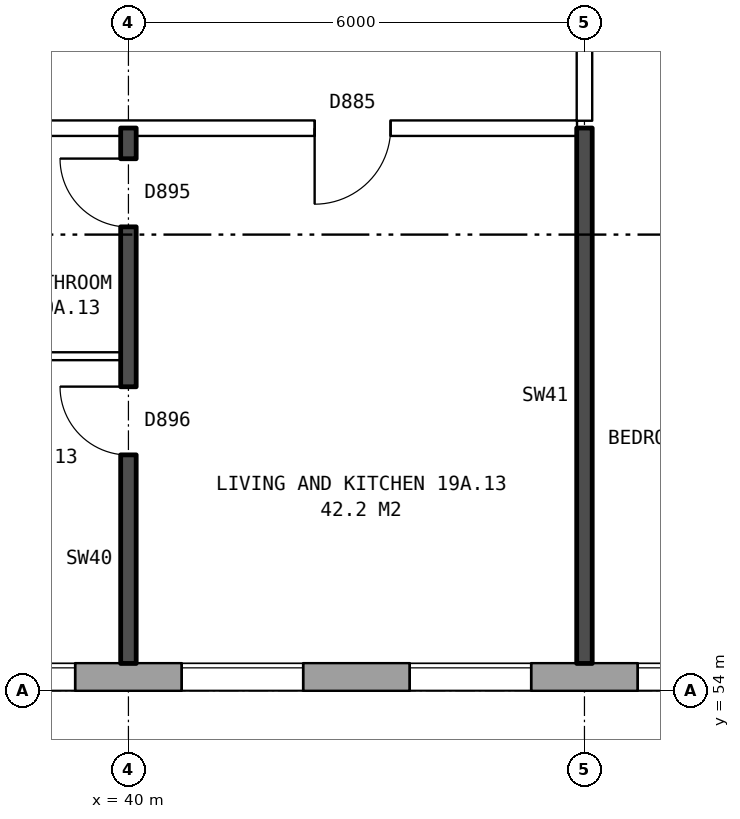
"""IFC4 building model, lengths in metres.
Left out: names, types, materials, properties, quantities, classifications, styles, units other than length and angle.
Written with IfcOpenShell. Run it as: python <this file> out.ifc"""

import sys

from ifc_helpers import new_model, si_unit, direction, frame, frame_2d, origin, place, context, subcontext, project, spatial, rectangle, extrude, element, fill, save


model = new_model("IFC4")
c1 = context("Model", 3, precision=1e-05, world=origin(), true_north=direction((0.0, 1.0)))
c2 = subcontext(c1, "Body", "Model", "MODEL_VIEW")
j1 = project(units=[si_unit("LENGTHUNIT", "METRE"), si_unit("PLANEANGLEUNIT", "RADIAN")], contexts=[c1])
p1 = place(None, origin())
s1 = spatial("IfcSite", under=j1, at=p1, CompositionType="ELEMENT")
p2 = place(p1, origin())
s2 = spatial("IfcBuilding", under=s1, at=p2, CompositionType="ELEMENT")
p3 = place(p2, frame((0.0, 0.0, 71.6)))
s3 = spatial("IfcBuildingStorey", under=s2, at=p3, CompositionType="ELEMENT", Elevation=71.6)
p4 = place(p3, frame((26.325, 54.18, 0.0), z_axis=(0.0, 0.0, 1.0), x_axis=(1.0, 0.0, 0.0)))
e1 = element("IfcWall", 1, at=p4, inside=s3, PredefinedType="STANDARD", context=c2, shape_type="SweptSolid", body=[
    extrude(rectangle(XDim=46.601, YDim=0.36, at=frame_2d((23.3, 0.0))), origin(), (0.0, 0.0, 1.0), 2.85),
])
p5 = place(p4, frame((1.875, 0.0, 1.0)))
e2 = element("IfcOpeningElement", 2, at=p5, cuts=e1, PredefinedType="OPENING", context=c2, shape_type="SweptSolid", body=[
    extrude(rectangle(XDim=0.6, YDim=1.5, at=frame_2d((0.3, 0.75))), frame((0.0, 0.19, 0.0), z_axis=(0.0, -1.0, 0.0), x_axis=(1.0, 0.0, 0.0)), (0.0, 0.0, 1.0), 0.38),
])
p6 = place(p4, frame((5.375, 0.0, 0.8)))
e3 = element("IfcOpeningElement", 3, at=p6, cuts=e1, PredefinedType="OPENING", context=c2, shape_type="SweptSolid", body=[
    extrude(rectangle(XDim=1.6, YDim=1.8, at=frame_2d((0.8, 0.9))), frame((0.0, 0.19, 0.0), z_axis=(0.0, -1.0, 0.0), x_axis=(1.0, 0.0, 0.0)), (0.0, 0.0, 1.0), 0.38),
])
p7 = place(p4, frame((8.375, 0.0, 0.8)))
e4 = element("IfcOpeningElement", 4, at=p7, cuts=e1, PredefinedType="OPENING", context=c2, shape_type="SweptSolid", body=[
    extrude(rectangle(XDim=1.6, YDim=1.8, at=frame_2d((0.8, 0.9))), frame((0.0, 0.19, 0.0), z_axis=(0.0, -1.0, 0.0), x_axis=(1.0, 0.0, 0.0)), (0.0, 0.0, 1.0), 0.38),
])
p8 = place(p4, frame((11.375, 0.0, 0.8)))
e5 = element("IfcOpeningElement", 5, at=p8, cuts=e1, PredefinedType="OPENING", context=c2, shape_type="SweptSolid", body=[
    extrude(rectangle(XDim=1.6, YDim=1.8, at=frame_2d((0.8, 0.9))), frame((0.0, 0.19, 0.0), z_axis=(0.0, -1.0, 0.0), x_axis=(1.0, 0.0, 0.0)), (0.0, 0.0, 1.0), 0.38),
])
p9 = place(p4, frame((14.375, 0.0, 0.8)))
e6 = element("IfcOpeningElement", 6, at=p9, cuts=e1, PredefinedType="OPENING", context=c2, shape_type="SweptSolid", body=[
    extrude(rectangle(XDim=1.6, YDim=1.8, at=frame_2d((0.8, 0.9))), frame((0.0, 0.19, 0.0), z_axis=(0.0, -1.0, 0.0), x_axis=(1.0, 0.0, 0.0)), (0.0, 0.0, 1.0), 0.38),
])
p10 = place(p4, frame((17.375, 0.0, 0.8)))
e7 = element("IfcOpeningElement", 7, at=p10, cuts=e1, PredefinedType="OPENING", context=c2, shape_type="SweptSolid", body=[
    extrude(rectangle(XDim=1.6, YDim=1.8, at=frame_2d((0.8, 0.9))), frame((0.0, 0.19, 0.0), z_axis=(0.0, -1.0, 0.0), x_axis=(1.0, 0.0, 0.0)), (0.0, 0.0, 1.0), 0.38),
])
p11 = place(p4, frame((20.375, 0.0, 0.8)))
e8 = element("IfcOpeningElement", 8, at=p11, cuts=e1, PredefinedType="OPENING", context=c2, shape_type="SweptSolid", body=[
    extrude(rectangle(XDim=1.6, YDim=1.8, at=frame_2d((0.8, 0.9))), frame((0.0, 0.19, 0.0), z_axis=(0.0, -1.0, 0.0), x_axis=(1.0, 0.0, 0.0)), (0.0, 0.0, 1.0), 0.38),
])
p12 = place(p4, frame((23.375, 0.0, 0.8)))
e9 = element("IfcOpeningElement", 9, at=p12, cuts=e1, PredefinedType="OPENING", context=c2, shape_type="SweptSolid", body=[
    extrude(rectangle(XDim=1.6, YDim=1.8, at=frame_2d((0.8, 0.9))), frame((0.0, 0.19, 0.0), z_axis=(0.0, -1.0, 0.0), x_axis=(1.0, 0.0, 0.0)), (0.0, 0.0, 1.0), 0.38),
])
p13 = place(p4, frame((26.375, 0.0, 0.8)))
e10 = element("IfcOpeningElement", 10, at=p13, cuts=e1, PredefinedType="OPENING", context=c2, shape_type="SweptSolid", body=[
    extrude(rectangle(XDim=1.6, YDim=1.8, at=frame_2d((0.8, 0.9))), frame((0.0, 0.19, 0.0), z_axis=(0.0, -1.0, 0.0), x_axis=(1.0, 0.0, 0.0)), (0.0, 0.0, 1.0), 0.38),
])
p14 = place(p4, frame((29.375, 0.0, 0.8)))
e11 = element("IfcOpeningElement", 11, at=p14, cuts=e1, PredefinedType="OPENING", context=c2, shape_type="SweptSolid", body=[
    extrude(rectangle(XDim=1.6, YDim=1.8, at=frame_2d((0.8, 0.9))), frame((0.0, 0.19, 0.0), z_axis=(0.0, -1.0, 0.0), x_axis=(1.0, 0.0, 0.0)), (0.0, 0.0, 1.0), 0.38),
])
p15 = place(p4, frame((32.375, 0.0, 0.8)))
e12 = element("IfcOpeningElement", 12, at=p15, cuts=e1, PredefinedType="OPENING", context=c2, shape_type="SweptSolid", body=[
    extrude(rectangle(XDim=1.6, YDim=1.8, at=frame_2d((0.8, 0.9))), frame((0.0, 0.19, 0.0), z_axis=(0.0, -1.0, 0.0), x_axis=(1.0, 0.0, 0.0)), (0.0, 0.0, 1.0), 0.38),
])
p16 = place(p4, frame((35.375, 0.0, 0.8)))
e13 = element("IfcOpeningElement", 13, at=p16, cuts=e1, PredefinedType="OPENING", context=c2, shape_type="SweptSolid", body=[
    extrude(rectangle(XDim=1.6, YDim=1.8, at=frame_2d((0.8, 0.9))), frame((0.0, 0.19, 0.0), z_axis=(0.0, -1.0, 0.0), x_axis=(1.0, 0.0, 0.0)), (0.0, 0.0, 1.0), 0.38),
])
p17 = place(p4, frame((38.375, 0.0, 0.8)))
e14 = element("IfcOpeningElement", 14, at=p17, cuts=e1, PredefinedType="OPENING", context=c2, shape_type="SweptSolid", body=[
    extrude(rectangle(XDim=1.6, YDim=1.8, at=frame_2d((0.8, 0.9))), frame((0.0, 0.19, 0.0), z_axis=(0.0, -1.0, 0.0), x_axis=(1.0, 0.0, 0.0)), (0.0, 0.0, 1.0), 0.38),
])
p18 = place(p4, frame((40.275, 0.0, 0.8)))
e15 = element("IfcOpeningElement", 15, at=p18, cuts=e1, PredefinedType="OPENING", context=c2, shape_type="SweptSolid", body=[
    extrude(rectangle(XDim=0.6, YDim=1.8, at=frame_2d((0.3, 0.9))), frame((0.0, 0.19, 0.0), z_axis=(0.0, -1.0, 0.0), x_axis=(1.0, 0.0, 0.0)), (0.0, 0.0, 1.0), 0.38),
])
p19 = place(p4, frame((44.375, 0.0, 0.8)))
e16 = element("IfcOpeningElement", 16, at=p19, cuts=e1, PredefinedType="OPENING", context=c2, shape_type="SweptSolid", body=[
    extrude(rectangle(XDim=1.6, YDim=1.8, at=frame_2d((0.8, 0.9))), frame((0.0, 0.19, 0.0), z_axis=(0.0, -1.0, 0.0), x_axis=(1.0, 0.0, 0.0)), (0.0, 0.0, 1.0), 0.38),
])
p20 = place(p4, frame((2.775, 0.0, 1.7)))
e17 = element("IfcOpeningElement", 17, at=p20, cuts=e1, PredefinedType="OPENING", context=c2, shape_type="SweptSolid", body=[
    extrude(rectangle(XDim=0.6, YDim=0.9, at=frame_2d((0.3, 0.45))), frame((0.0, 0.19, 0.0), z_axis=(0.0, -1.0, 0.0), x_axis=(1.0, 0.0, 0.0)), (0.0, 0.0, 1.0), 0.38),
])
p21 = place(p4, frame((41.175, 0.0, 0.8)))
e18 = element("IfcOpeningElement", 18, at=p21, cuts=e1, PredefinedType="OPENING", context=c2, shape_type="SweptSolid", body=[
    extrude(rectangle(XDim=0.8, YDim=0.9, at=frame_2d((0.4, 0.45))), frame((0.0, 0.19, 0.0), z_axis=(0.0, -1.0, 0.0), x_axis=(1.0, 0.0, 0.0)), (0.0, 0.0, 1.0), 0.38),
])
p22 = place(p3, frame((38.3, 58.4, 0.0), z_axis=(0.0, 0.0, 1.0), x_axis=(1.0, 0.0, 0.0)))
e19 = element("IfcWall", 19, at=p22, inside=s3, PredefinedType="PARTITIONING", context=c2, shape_type="SweptSolid", body=[
    extrude(rectangle(XDim=1.6, YDim=0.1, at=frame_2d((0.8, 0.0))), origin(), (0.0, 0.0, 1.0), 2.85),
])
p23 = place(p3, frame((23.61, 61.4, 0.0), z_axis=(0.0, 0.0, 1.0), x_axis=(1.0, 0.0, 0.0)))
e20 = element("IfcWall", 20, at=p23, inside=s3, PredefinedType="PARTITIONING", context=c2, shape_type="SweptSolid", body=[
    extrude(rectangle(XDim=22.29, YDim=0.2, at=frame_2d((11.145, 0.0))), origin(), (0.0, 0.0, 1.0), 2.85),
])
p24 = place(p23, frame((18.84, 0.0, 0.0)))
e21 = element("IfcOpeningElement", 21, at=p24, cuts=e20, PredefinedType="OPENING", context=c2, shape_type="SweptSolid", body=[
    extrude(rectangle(XDim=1.0, YDim=2.1, at=frame_2d((0.5, 1.05))), frame((0.0, 0.11, 0.0), z_axis=(0.0, -1.0, 0.0), x_axis=(1.0, 0.0, 0.0)), (0.0, 0.0, 1.0), 0.22),
])
p25 = place(p23, frame((6.89, 0.0, 0.0)))
e22 = element("IfcOpeningElement", 22, at=p25, cuts=e20, PredefinedType="OPENING", context=c2, shape_type="SweptSolid", body=[
    extrude(rectangle(XDim=1.0, YDim=2.1, at=frame_2d((0.5, 1.05))), frame((0.0, 0.11, 0.0), z_axis=(0.0, -1.0, 0.0), x_axis=(1.0, 0.0, 0.0)), (0.0, 0.0, 1.0), 0.22),
])
p26 = place(p3, frame((40.0, 54.36, 0.0), z_axis=(0.0, 0.0, 1.0), x_axis=(0.0, 1.0, 0.0)))
e23 = element("IfcWall", 23, at=p26, inside=s3, PredefinedType="SOLIDWALL", context=c2, shape_type="SweptSolid", body=[
    extrude(rectangle(XDim=7.04, YDim=0.2, at=frame_2d((3.52, 0.0))), origin(), (0.0, 0.0, 1.0), 2.85),
])
p27 = place(p26, frame((2.74, 0.0, 0.0)))
e24 = element("IfcOpeningElement", 24, at=p27, cuts=e23, PredefinedType="OPENING", context=c2, shape_type="SweptSolid", body=[
    extrude(rectangle(XDim=0.9, YDim=2.1, at=frame_2d((0.45, 1.05))), frame((0.0, 0.11, 0.0), z_axis=(0.0, -1.0, 0.0), x_axis=(1.0, 0.0, 0.0)), (0.0, 0.0, 1.0), 0.22),
])
p28 = place(p26, frame((5.74, 0.0, 0.0)))
e25 = element("IfcOpeningElement", 25, at=p28, cuts=e23, PredefinedType="OPENING", context=c2, shape_type="SweptSolid", body=[
    extrude(rectangle(XDim=0.9, YDim=2.1, at=frame_2d((0.45, 1.05))), frame((0.0, 0.11, 0.0), z_axis=(0.0, -1.0, 0.0), x_axis=(1.0, 0.0, 0.0)), (0.0, 0.0, 1.0), 0.22),
])
p29 = place(p3, frame((46.0, 54.36, 0.0), z_axis=(0.0, 0.0, 1.0), x_axis=(0.0, 1.0, 0.0)))
e26 = element("IfcWall", 26, at=p29, inside=s3, PredefinedType="SOLIDWALL", context=c2, shape_type="SweptSolid", body=[
    extrude(rectangle(XDim=7.04, YDim=0.2, at=frame_2d((3.52, 0.0))), origin(), (0.0, 0.0, 1.0), 2.85),
])
p30 = place(p3, frame((46.0, 61.5, 0.0), z_axis=(0.0, 0.0, 1.0), x_axis=(0.0, 1.0, 0.0)))
e27 = element("IfcWall", 27, at=p30, inside=s3, PredefinedType="PARTITIONING", context=c2, shape_type="SweptSolid", body=[
    extrude(rectangle(XDim=2.2, YDim=0.2, at=frame_2d((1.1, 0.0))), origin(), (0.0, 0.0, 1.0), 2.85),
])
p31 = place(p8, origin())
e28 = element("IfcWindow", 28, at=p31, inside=s3, PartitioningType="SINGLE_PANEL", PredefinedType="WINDOW", context=c2, shape_type="SweptSolid", body=[
    extrude(rectangle(XDim=1.6, YDim=1.8, at=frame_2d((0.8, 0.9))), frame((0.0, 0.15, 0.0), z_axis=(0.0, -1.0, 0.0), x_axis=(1.0, 0.0, 0.0)), (0.0, 0.0, 1.0), 0.06),
])
fill(e5, e28)
p32 = place(p9, origin())
e29 = element("IfcWindow", 29, at=p32, inside=s3, PartitioningType="SINGLE_PANEL", PredefinedType="WINDOW", context=c2, shape_type="SweptSolid", body=[
    extrude(rectangle(XDim=1.6, YDim=1.8, at=frame_2d((0.8, 0.9))), frame((0.0, 0.15, 0.0), z_axis=(0.0, -1.0, 0.0), x_axis=(1.0, 0.0, 0.0)), (0.0, 0.0, 1.0), 0.06),
])
fill(e6, e29)
p33 = place(p10, origin())
e30 = element("IfcWindow", 30, at=p33, inside=s3, PartitioningType="SINGLE_PANEL", PredefinedType="WINDOW", context=c2, shape_type="SweptSolid", body=[
    extrude(rectangle(XDim=1.6, YDim=1.8, at=frame_2d((0.8, 0.9))), frame((0.0, 0.15, 0.0), z_axis=(0.0, -1.0, 0.0), x_axis=(1.0, 0.0, 0.0)), (0.0, 0.0, 1.0), 0.06),
])
fill(e7, e30)
p34 = place(p11, origin())
e31 = element("IfcWindow", 31, at=p34, inside=s3, PartitioningType="SINGLE_PANEL", PredefinedType="WINDOW", context=c2, shape_type="SweptSolid", body=[
    extrude(rectangle(XDim=1.6, YDim=1.8, at=frame_2d((0.8, 0.9))), frame((0.0, 0.15, 0.0), z_axis=(0.0, -1.0, 0.0), x_axis=(1.0, 0.0, 0.0)), (0.0, 0.0, 1.0), 0.06),
])
fill(e8, e31)
p35 = place(p27, origin())
e32 = element("IfcDoor", 32, at=p35, inside=s3, OperationType="SINGLE_SWING_RIGHT", PredefinedType="DOOR", context=c2, shape_type="SweptSolid", body=[
    extrude(rectangle(XDim=0.9, YDim=2.1, at=frame_2d((0.45, 1.05))), frame((0.0, 0.025, 0.0), z_axis=(0.0, -1.0, 0.0), x_axis=(1.0, 0.0, 0.0)), (0.0, 0.0, 1.0), 0.05),
])
fill(e24, e32)
p36 = place(p24, frame((1.0, 0.0, 0.0), z_axis=(0.0, 0.0, 1.0), x_axis=(-1.0, 0.0, 0.0)))
e33 = element("IfcDoor", 33, at=p36, inside=s3, OperationType="SINGLE_SWING_RIGHT", PredefinedType="DOOR", context=c2, shape_type="SweptSolid", body=[
    extrude(rectangle(XDim=1.0, YDim=2.1, at=frame_2d((0.5, 1.05))), frame((0.0, 0.025, 0.0), z_axis=(0.0, -1.0, 0.0), x_axis=(1.0, 0.0, 0.0)), (0.0, 0.0, 1.0), 0.05),
])
fill(e21, e33)
p37 = place(p28, origin())
e34 = element("IfcDoor", 34, at=p37, inside=s3, OperationType="SINGLE_SWING_RIGHT", PredefinedType="DOOR", context=c2, shape_type="SweptSolid", body=[
    extrude(rectangle(XDim=0.9, YDim=2.1, at=frame_2d((0.45, 1.05))), frame((0.0, 0.025, 0.0), z_axis=(0.0, -1.0, 0.0), x_axis=(1.0, 0.0, 0.0)), (0.0, 0.0, 1.0), 0.05),
])
fill(e25, e34)
save(model, sys.argv[1])
